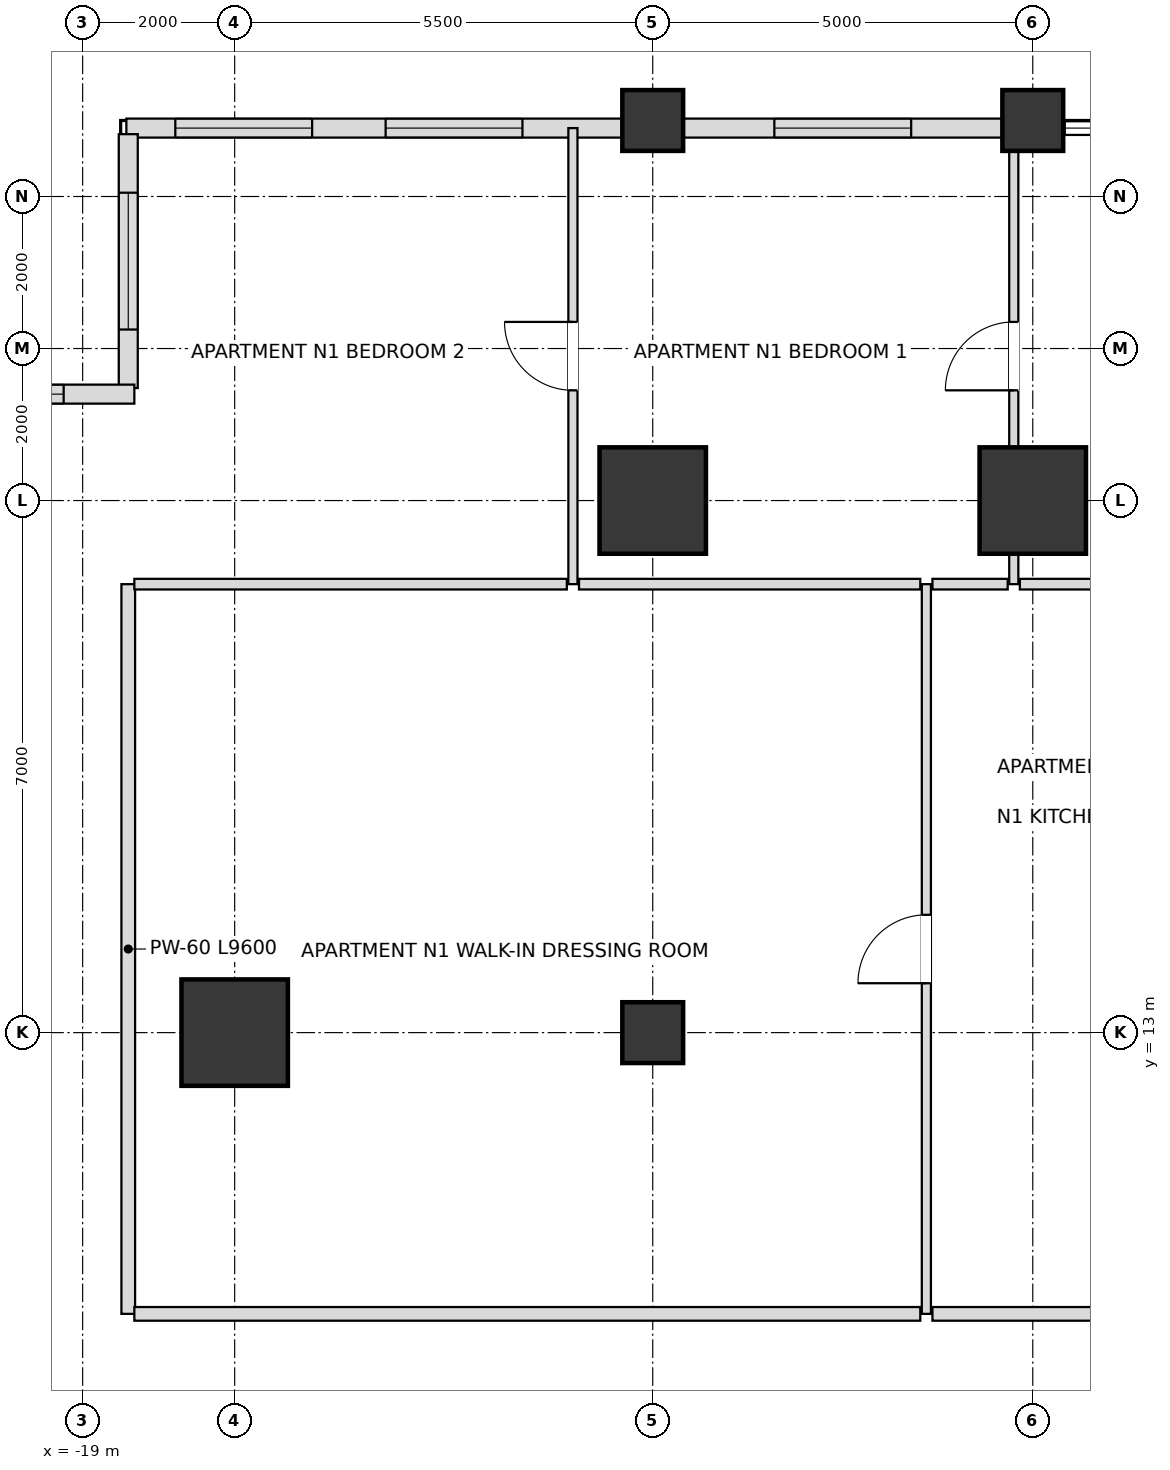
"""IFC4 building model, lengths in metres.
Left out: names, types, materials, properties, quantities, classifications, styles, units other than length and angle.
Written with IfcOpenShell. Run it as: python <this file> out.ifc"""

import sys

from ifc_helpers import new_model, si_unit, direction, frame, frame_2d, origin, origin_2d, place, context, subcontext, project, spatial, rectangle, extrude, element, fill, save


model = new_model("IFC4")
c1 = context("Model", 3, precision=1e-05, world=origin(), true_north=direction((0.0, 1.0)))
c2 = subcontext(c1, "Body", "Model", "MODEL_VIEW")
j1 = project(units=[si_unit("LENGTHUNIT", "METRE"), si_unit("PLANEANGLEUNIT", "RADIAN")], contexts=[c1])
p1 = place(None, origin())
s1 = spatial("IfcSite", under=j1, at=p1, CompositionType="ELEMENT")
p2 = place(p1, origin())
s2 = spatial("IfcBuilding", under=s1, at=p2, CompositionType="ELEMENT")
p3 = place(p2, frame((0.0, 0.0, 90.0)))
s3 = spatial("IfcBuildingStorey", under=s2, at=p3, CompositionType="ELEMENT", Elevation=90.0)
for number, where, z_axis, x_axis in (
    (1, (-6.5, 20.0, 0.0), (0.0, 0.0, 1.0), (1.0, 0.0, 0.0)),
    (2, (-11.5, 20.0, 0.0), (0.0, 0.0, 1.0), (1.0, 0.0, 0.0)),
    (3, (-17.0, 13.0, 0.0), (0.0, 0.0, 1.0), (1.0, 0.0, 0.0)),
):
    element("IfcColumn", number, at=place(p3, frame(where, z_axis=z_axis, x_axis=x_axis)), inside=s3, PredefinedType="USERDEFINED", context=c2, shape_type="SweptSolid", body=[
        extrude(rectangle(XDim=1.4, YDim=1.4, at=origin_2d()), origin(), (0.0, 0.0, 1.0), 3.6),
    ])
for number, where, z_axis, x_axis in (
    (4, (-11.5, 13.0, 0.0), (0.0, 0.0, 1.0), (1.0, 0.0, 0.0)),
    (5, (-11.5, 25.0, 0.0), (0.0, 0.0, 1.0), (1.0, 0.0, 0.0)),
    (6, (-6.5, 25.0, 0.0), (0.0, 0.0, 1.0), (1.0, 0.0, 0.0)),
):
    element("IfcColumn", number, at=place(p3, frame(where, z_axis=z_axis, x_axis=x_axis)), inside=s3, PredefinedType="COLUMN", context=c2, shape_type="SweptSolid", body=[
        extrude(rectangle(XDim=0.8, YDim=0.8, at=origin_2d()), origin(), (0.0, 0.0, 1.0), 3.6),
    ])
p4 = place(p3, frame((-6.895, 24.9, 0.0), z_axis=(0.0, 0.0, 1.0), x_axis=(-1.0, 0.0, 0.0)))
e7 = element("IfcWall", 7, at=p4, inside=s3, PredefinedType="SOLIDWALL", context=c2, shape_type="SweptSolid", body=[
    extrude(rectangle(XDim=4.21, YDim=0.25, at=frame_2d((2.105, 0.0))), origin(), (0.0, 0.0, 1.0), 2.59),
])
p5 = place(p4, frame((1.205, 0.0, 0.72)))
e8 = element("IfcOpeningElement", 8, at=p5, cuts=e7, PredefinedType="OPENING", context=c2, shape_type="SweptSolid", body=[
    extrude(rectangle(XDim=1.8, YDim=1.68, at=frame_2d((0.9, 0.84))), frame((0.0, 0.135, 0.0), z_axis=(0.0, -1.0, 0.0), x_axis=(1.0, 0.0, 0.0)), (0.0, 0.0, 1.0), 0.27),
])
p6 = place(p3, frame((-11.895, 24.9, 0.0), z_axis=(0.0, 0.0, 1.0), x_axis=(-1.0, 0.0, 0.0)))
e9 = element("IfcWall", 9, at=p6, inside=s3, PredefinedType="SOLIDWALL", context=c2, shape_type="SweptSolid", body=[
    extrude(rectangle(XDim=6.53, YDim=0.25, at=frame_2d((3.265, 0.0))), origin(), (0.0, 0.0, 1.0), 2.59),
])
p7 = place(p6, frame((1.319, 0.0, 0.72)))
e10 = element("IfcOpeningElement", 10, at=p7, cuts=e9, PredefinedType="OPENING", context=c2, shape_type="SweptSolid", body=[
    extrude(rectangle(XDim=1.8, YDim=1.68, at=frame_2d((0.9, 0.84))), frame((0.0, 0.135, 0.0), z_axis=(0.0, -1.0, 0.0), x_axis=(1.0, 0.0, 0.0)), (0.0, 0.0, 1.0), 0.27),
])
p8 = place(p6, frame((4.086, 0.0, 0.72)))
e11 = element("IfcOpeningElement", 11, at=p8, cuts=e9, PredefinedType="OPENING", context=c2, shape_type="SweptSolid", body=[
    extrude(rectangle(XDim=1.8, YDim=1.68, at=frame_2d((0.9, 0.84))), frame((0.0, 0.135, 0.0), z_axis=(0.0, -1.0, 0.0), x_axis=(1.0, 0.0, 0.0)), (0.0, 0.0, 1.0), 0.27),
])
p9 = place(p3, frame((-18.4, 24.82, 0.0), z_axis=(0.0, 0.0, 1.0), x_axis=(0.0, -1.0, 0.0)))
e12 = element("IfcWall", 12, at=p9, inside=s3, PredefinedType="SOLIDWALL", context=c2, shape_type="SweptSolid", body=[
    extrude(rectangle(XDim=3.34, YDim=0.25, at=frame_2d((1.67, 0.0))), origin(), (0.0, 0.0, 1.0), 2.59),
])
p10 = place(p9, frame((0.77, 0.0, 0.72)))
e13 = element("IfcOpeningElement", 13, at=p10, cuts=e12, PredefinedType="OPENING", context=c2, shape_type="SweptSolid", body=[
    extrude(rectangle(XDim=1.8, YDim=1.68, at=frame_2d((0.9, 0.84))), frame((0.0, 0.135, 0.0), z_axis=(0.0, -1.0, 0.0), x_axis=(1.0, 0.0, 0.0)), (0.0, 0.0, 1.0), 0.27),
])
p11 = place(p3, frame((-18.32, 21.4, 0.0), z_axis=(0.0, 0.0, 1.0), x_axis=(-1.0, 0.0, 0.0)))
e14 = element("IfcWall", 14, at=p11, inside=s3, PredefinedType="SOLIDWALL", context=c2, shape_type="SweptSolid", body=[
    extrude(rectangle(XDim=3.66, YDim=0.25, at=frame_2d((1.83, 0.0))), origin(), (0.0, 0.0, 1.0), 2.59),
])
p12 = place(p11, frame((0.93, 0.0, 0.72)))
e15 = element("IfcOpeningElement", 15, at=p12, cuts=e14, PredefinedType="OPENING", context=c2, shape_type="SweptSolid", body=[
    extrude(rectangle(XDim=1.8, YDim=1.68, at=frame_2d((0.9, 0.84))), frame((0.0, 0.135, 0.0), z_axis=(0.0, -1.0, 0.0), x_axis=(1.0, 0.0, 0.0)), (0.0, 0.0, 1.0), 0.27),
])
p13 = place(p3, frame((-18.4, 9.3, 0.0), z_axis=(0.0, 0.0, 1.0), x_axis=(0.0, 1.0, 0.0)))
e16 = element("IfcWall", 16, at=p13, inside=s3, PredefinedType="PARTITIONING", context=c2, shape_type="SweptSolid", body=[
    extrude(rectangle(XDim=9.6, YDim=0.18, at=frame_2d((4.8, 0.0))), origin(), (0.0, 0.0, 1.0), 2.59),
])
p14 = place(p3, frame((-12.55, 18.9, 0.0), z_axis=(0.0, 0.0, 1.0), x_axis=(0.0, 1.0, 0.0)))
e17 = element("IfcWall", 17, at=p14, inside=s3, PredefinedType="PARTITIONING", context=c2, shape_type="SweptSolid", body=[
    extrude(rectangle(XDim=6.0, YDim=0.12, at=frame_2d((3.0, 0.0))), origin(), (0.0, 0.0, 1.0), 2.59),
])
p15 = place(p14, frame((2.55, 0.0, 0.0)))
e18 = element("IfcOpeningElement", 18, at=p15, cuts=e17, PredefinedType="OPENING", context=c2, shape_type="SweptSolid", body=[
    extrude(rectangle(XDim=0.9, YDim=2.1, at=frame_2d((0.45, 1.05))), frame((0.0, 0.07, 0.0), z_axis=(0.0, -1.0, 0.0), x_axis=(1.0, 0.0, 0.0)), (0.0, 0.0, 1.0), 0.14),
])
p16 = place(p3, frame((-7.9, 9.3, 0.0), z_axis=(0.0, 0.0, 1.0), x_axis=(0.0, 1.0, 0.0)))
e19 = element("IfcWall", 19, at=p16, inside=s3, PredefinedType="PARTITIONING", context=c2, shape_type="SweptSolid", body=[
    extrude(rectangle(XDim=9.6, YDim=0.12, at=frame_2d((4.8, 0.0))), origin(), (0.0, 0.0, 1.0), 2.736),
])
p17 = place(p16, frame((4.35, 0.0, 0.0)))
e20 = element("IfcOpeningElement", 20, at=p17, cuts=e19, PredefinedType="OPENING", context=c2, shape_type="SweptSolid", body=[
    extrude(rectangle(XDim=0.9, YDim=2.1, at=frame_2d((0.45, 1.05))), frame((0.0, 0.07, 0.0), z_axis=(0.0, -1.0, 0.0), x_axis=(1.0, 0.0, 0.0)), (0.0, 0.0, 1.0), 0.14),
])
p18 = place(p3, frame((-6.75, 18.9, 0.0), z_axis=(0.0, 0.0, 1.0), x_axis=(0.0, 1.0, 0.0)))
e21 = element("IfcWall", 21, at=p18, inside=s3, PredefinedType="PARTITIONING", context=c2, shape_type="SweptSolid", body=[
    extrude(rectangle(XDim=6.0, YDim=0.12, at=frame_2d((3.0, 0.0))), origin(), (0.0, 0.0, 1.0), 2.736),
])
p19 = place(p18, frame((2.55, 0.0, 0.0)))
e22 = element("IfcOpeningElement", 22, at=p19, cuts=e21, PredefinedType="OPENING", context=c2, shape_type="SweptSolid", body=[
    extrude(rectangle(XDim=0.9, YDim=2.1, at=frame_2d((0.45, 1.05))), frame((0.0, 0.07, 0.0), z_axis=(0.0, -1.0, 0.0), x_axis=(1.0, 0.0, 0.0)), (0.0, 0.0, 1.0), 0.14),
])
p20 = place(p3, frame((-18.32, 9.3, 0.0), z_axis=(0.0, 0.0, 1.0), x_axis=(1.0, 0.0, 0.0)))
e23 = element("IfcWall", 23, at=p20, inside=s3, PredefinedType="PARTITIONING", context=c2, shape_type="SweptSolid", body=[
    extrude(rectangle(XDim=10.34, YDim=0.18, at=frame_2d((5.17, 0.0))), origin(), (0.0, 0.0, 1.0), 2.736),
])
p21 = place(p3, frame((-7.82, 9.3, 0.0), z_axis=(0.0, 0.0, 1.0), x_axis=(1.0, 0.0, 0.0)))
e24 = element("IfcWall", 24, at=p21, inside=s3, PredefinedType="PARTITIONING", context=c2, shape_type="SweptSolid", body=[
    extrude(rectangle(XDim=3.04, YDim=0.18, at=frame_2d((1.52, 0.0))), origin(), (0.0, 0.0, 1.0), 2.736),
])
p22 = place(p3, frame((-18.32, 18.9, 0.0), z_axis=(0.0, 0.0, 1.0), x_axis=(1.0, 0.0, 0.0)))
e25 = element("IfcWall", 25, at=p22, inside=s3, PredefinedType="PARTITIONING", context=c2, shape_type="SweptSolid", body=[
    extrude(rectangle(XDim=5.69, YDim=0.14, at=frame_2d((2.845, 0.0))), origin(), (0.0, 0.0, 1.0), 2.59),
])
p23 = place(p3, frame((-12.47, 18.9, 0.0), z_axis=(0.0, 0.0, 1.0), x_axis=(1.0, 0.0, 0.0)))
e26 = element("IfcWall", 26, at=p23, inside=s3, PredefinedType="PARTITIONING", context=c2, shape_type="SweptSolid", body=[
    extrude(rectangle(XDim=4.49, YDim=0.14, at=frame_2d((2.245, 0.0))), origin(), (0.0, 0.0, 1.0), 2.59),
])
p24 = place(p3, frame((-7.82, 18.9, 0.0), z_axis=(0.0, 0.0, 1.0), x_axis=(1.0, 0.0, 0.0)))
e27 = element("IfcWall", 27, at=p24, inside=s3, PredefinedType="PARTITIONING", context=c2, shape_type="SweptSolid", body=[
    extrude(rectangle(XDim=0.99, YDim=0.14, at=frame_2d((0.495, 0.0))), origin(), (0.0, 0.0, 1.0), 3.3),
])
p25 = place(p3, frame((-6.67, 18.9, 0.0), z_axis=(0.0, 0.0, 1.0), x_axis=(1.0, 0.0, 0.0)))
e28 = element("IfcWall", 28, at=p25, inside=s3, PredefinedType="PARTITIONING", context=c2, shape_type="SweptSolid", body=[
    extrude(rectangle(XDim=1.89, YDim=0.14, at=frame_2d((0.945, 0.0))), origin(), (0.0, 0.0, 1.0), 2.736),
])
p26 = place(p5, origin())
e29 = element("IfcWindow", 29, at=p26, inside=s3, PartitioningType="SINGLE_PANEL", PredefinedType="WINDOW", context=c2, shape_type="SweptSolid", body=[
    extrude(rectangle(XDim=1.8, YDim=1.68, at=frame_2d((0.9, 0.84))), frame((0.0, 0.03, 0.0), z_axis=(0.0, -1.0, 0.0), x_axis=(1.0, 0.0, 0.0)), (0.0, 0.0, 1.0), 0.06),
])
fill(e8, e29)
p27 = place(p7, origin())
e30 = element("IfcWindow", 30, at=p27, inside=s3, PartitioningType="SINGLE_PANEL", PredefinedType="WINDOW", context=c2, shape_type="SweptSolid", body=[
    extrude(rectangle(XDim=1.8, YDim=1.68, at=frame_2d((0.9, 0.84))), frame((0.0, 0.03, 0.0), z_axis=(0.0, -1.0, 0.0), x_axis=(1.0, 0.0, 0.0)), (0.0, 0.0, 1.0), 0.06),
])
fill(e10, e30)
p28 = place(p8, origin())
e31 = element("IfcWindow", 31, at=p28, inside=s3, PartitioningType="SINGLE_PANEL", PredefinedType="WINDOW", context=c2, shape_type="SweptSolid", body=[
    extrude(rectangle(XDim=1.8, YDim=1.68, at=frame_2d((0.9, 0.84))), frame((0.0, 0.03, 0.0), z_axis=(0.0, -1.0, 0.0), x_axis=(1.0, 0.0, 0.0)), (0.0, 0.0, 1.0), 0.06),
])
fill(e11, e31)
p29 = place(p10, origin())
e32 = element("IfcWindow", 32, at=p29, inside=s3, PartitioningType="SINGLE_PANEL", PredefinedType="WINDOW", context=c2, shape_type="SweptSolid", body=[
    extrude(rectangle(XDim=1.8, YDim=1.68, at=frame_2d((0.9, 0.84))), frame((0.0, 0.03, 0.0), z_axis=(0.0, -1.0, 0.0), x_axis=(1.0, 0.0, 0.0)), (0.0, 0.0, 1.0), 0.06),
])
fill(e13, e32)
p30 = place(p12, origin())
e33 = element("IfcWindow", 33, at=p30, inside=s3, PartitioningType="SINGLE_PANEL", PredefinedType="WINDOW", context=c2, shape_type="SweptSolid", body=[
    extrude(rectangle(XDim=1.8, YDim=1.68, at=frame_2d((0.9, 0.84))), frame((0.0, 0.03, 0.0), z_axis=(0.0, -1.0, 0.0), x_axis=(1.0, 0.0, 0.0)), (0.0, 0.0, 1.0), 0.06),
])
fill(e15, e33)
p31 = place(p17, origin())
e34 = element("IfcDoor", 34, at=p31, inside=s3, OperationType="SINGLE_SWING_LEFT", PredefinedType="DOOR", context=c2, shape_type="SweptSolid", body=[
    extrude(rectangle(XDim=0.9, YDim=2.1, at=frame_2d((0.45, 1.05))), frame((0.0, 0.025, 0.0), z_axis=(0.0, -1.0, 0.0), x_axis=(1.0, 0.0, 0.0)), (0.0, 0.0, 1.0), 0.05),
])
fill(e20, e34)
p32 = place(p19, origin())
e35 = element("IfcDoor", 35, at=p32, inside=s3, OperationType="SINGLE_SWING_LEFT", PredefinedType="DOOR", context=c2, shape_type="SweptSolid", body=[
    extrude(rectangle(XDim=0.9, YDim=2.1, at=frame_2d((0.45, 1.05))), frame((0.0, 0.025, 0.0), z_axis=(0.0, -1.0, 0.0), x_axis=(1.0, 0.0, 0.0)), (0.0, 0.0, 1.0), 0.05),
])
fill(e22, e35)
p33 = place(p15, origin())
e36 = element("IfcDoor", 36, at=p33, inside=s3, OperationType="SINGLE_SWING_RIGHT", PredefinedType="DOOR", context=c2, shape_type="SweptSolid", body=[
    extrude(rectangle(XDim=0.9, YDim=2.1, at=frame_2d((0.45, 1.05))), frame((0.0, 0.025, 0.0), z_axis=(0.0, -1.0, 0.0), x_axis=(1.0, 0.0, 0.0)), (0.0, 0.0, 1.0), 0.05),
])
fill(e18, e36)
save(model, sys.argv[1])
